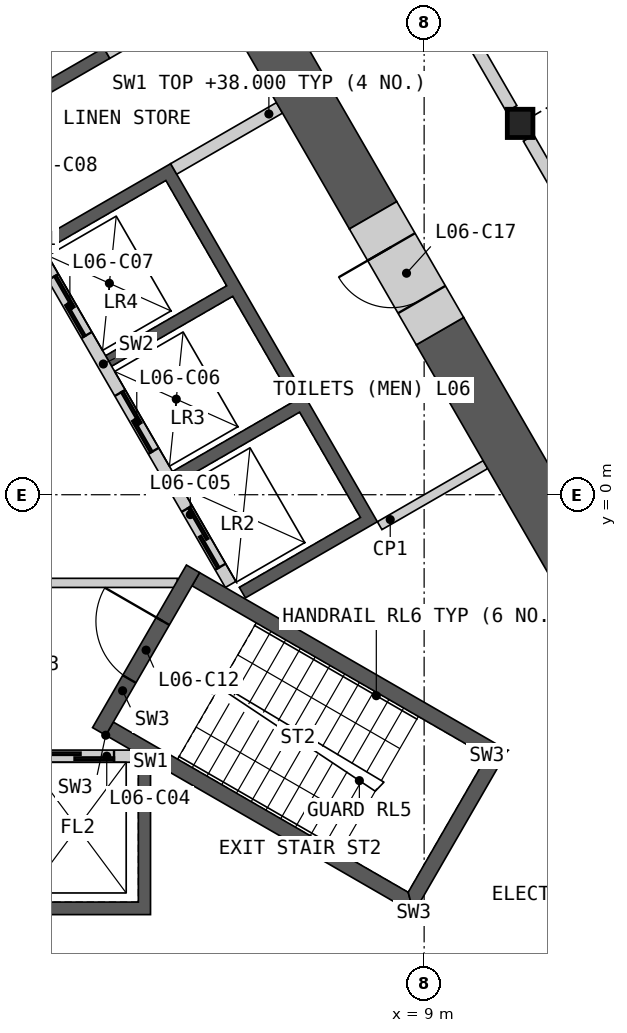
"""IFC4 building model, lengths in metres.
Left out: names, types, materials, properties, quantities, classifications, styles, units other than length and angle.
Written with IfcOpenShell. Run it as: python <this file> out.ifc"""

import sys

from ifc_helpers import new_model, si_unit, direction, frame, frame_2d, origin, origin_2d, place, context, subcontext, project, spatial, polyline, rectangle, i_section, outline, extrude, element, fill, save


model = new_model("IFC4")
c1 = context("Model", 3, precision=1e-05, world=origin(), true_north=direction((0.0, 1.0)))
c2 = subcontext(c1, "Body", "Model", "MODEL_VIEW")
j1 = project(units=[si_unit("LENGTHUNIT", "METRE"), si_unit("PLANEANGLEUNIT", "RADIAN")], contexts=[c1])
p1 = place(None, origin())
s1 = spatial("IfcSite", under=j1, at=p1, CompositionType="ELEMENT")
p2 = place(p1, origin())
s2 = spatial("IfcBuilding", under=s1, at=p2, CompositionType="ELEMENT")
p3 = place(p2, frame((0.0, 0.0, 34.2)))
s3 = spatial("IfcBuildingStorey", under=s2, at=p3, CompositionType="ELEMENT", Elevation=34.2)
p4 = place(p3, frame((10.578, 6.107, 0.0), z_axis=(0.0, 0.0, 1.0), x_axis=(1.0, 0.0, 0.0)))
e1 = element("IfcColumn", 1, at=p4, inside=s3, PredefinedType="COLUMN", context=c2, shape_type="SweptSolid", body=[
    extrude(i_section(OverallWidth=0.421, OverallDepth=0.465, WebThickness=0.045, FlangeThickness=0.072, at=origin_2d()), origin(), (0.0, 0.0, 1.0), 4.2),
])
p5 = place(p3, origin())
e2 = element("IfcWall", 2, at=p5, inside=s3, PredefinedType="SHEAR", context=c2, shape_type="SweptSolid", body=[
    extrude(outline(polyline([(4.5, -4.4), (4.5, -6.906), (-4.5, -6.906), (-4.5, -4.4), (-4.3, -4.4), (-4.3, -6.7), (-2.3, -6.7), (-2.3, -4.4), (-2.1, -4.4), (-2.1, -6.7), (-0.1, -6.7), (-0.1, -4.4), (0.1, -4.4), (0.1, -6.7), (2.1, -6.7), (2.1, -4.4), (2.3, -4.4), (2.3, -6.7), (4.3, -6.7), (4.3, -4.4), (4.5, -4.4)])), origin(), (0.0, 0.0, 1.0), 3.8),
])
p6 = place(p3, frame((-4.187, -4.3, 0.0), z_axis=(0.0, 0.0, 1.0), x_axis=(1.0, 0.0, 0.0)))
e3 = element("IfcWall", 3, at=p6, inside=s3, PredefinedType="SOLIDWALL", context=c2, shape_type="SweptSolid", body=[
    extrude(rectangle(XDim=8.373, YDim=0.2, at=frame_2d((4.187, 0.0))), origin(), (0.0, 0.0, 1.0), 3.8),
])
p7 = place(p6, frame((0.287, 0.0, 0.0)))
e4 = element("IfcOpeningElement", 4, at=p7, cuts=e3, PredefinedType="OPENING", context=c2, shape_type="SweptSolid", body=[
    extrude(rectangle(XDim=1.2, YDim=2.1, at=frame_2d((0.6, 1.05))), frame((0.0, 0.11, 0.0), z_axis=(0.0, -1.0, 0.0), x_axis=(1.0, 0.0, 0.0)), (0.0, 0.0, 1.0), 0.22),
])
p8 = place(p6, frame((2.387, 0.0, 0.0)))
e5 = element("IfcOpeningElement", 5, at=p8, cuts=e3, PredefinedType="OPENING", context=c2, shape_type="SweptSolid", body=[
    extrude(rectangle(XDim=1.4, YDim=2.1, at=frame_2d((0.7, 1.05))), frame((0.0, 0.11, 0.0), z_axis=(0.0, -1.0, 0.0), x_axis=(1.0, 0.0, 0.0)), (0.0, 0.0, 1.0), 0.22),
])
p9 = place(p6, frame((4.737, 0.0, 0.0)))
e6 = element("IfcOpeningElement", 6, at=p9, cuts=e3, PredefinedType="OPENING", context=c2, shape_type="SweptSolid", body=[
    extrude(rectangle(XDim=1.1, YDim=2.1, at=frame_2d((0.55, 1.05))), frame((0.0, 0.11, 0.0), z_axis=(0.0, -1.0, 0.0), x_axis=(1.0, 0.0, 0.0)), (0.0, 0.0, 1.0), 0.22),
])
p10 = place(p6, frame((6.887, 0.0, 0.0)))
e7 = element("IfcOpeningElement", 7, at=p10, cuts=e3, PredefinedType="OPENING", context=c2, shape_type="SweptSolid", body=[
    extrude(rectangle(XDim=1.2, YDim=2.1, at=frame_2d((0.6, 1.05))), frame((0.0, 0.11, 0.0), z_axis=(0.0, -1.0, 0.0), x_axis=(1.0, 0.0, 0.0)), (0.0, 0.0, 1.0), 0.22),
])
p11 = place(p3, origin())
e8 = element("IfcWall", 8, at=p11, inside=s3, PredefinedType="SHEAR", context=c2, shape_type="SweptSolid", body=[
    extrude(outline(polyline([(1.561, 6.097), (3.731, 7.35), (3.831, 7.177), (1.66, 5.924), (1.561, 6.097)])), origin(), (0.0, 0.0, 1.0), 3.8),
])
p12 = place(p3, origin())
e9 = element("IfcWall", 9, at=p12, inside=s3, PredefinedType="SHEAR", context=c2, shape_type="SweptSolid", body=[
    extrude(outline(polyline([(2.66, 4.192), (4.831, 5.445), (8.231, -0.444), (6.061, -1.697), (5.96, -1.524), (7.952, -0.374), (6.952, 1.358), (4.96, 0.208), (4.861, 0.381), (6.852, 1.531), (5.852, 3.263), (3.861, 2.113), (3.76, 2.287), (5.752, 3.437), (4.752, 5.169), (2.76, 4.019), (2.66, 4.192)])), origin(), (0.0, 0.0, 1.0), 3.8),
])
p13 = place(p3, frame((5.817, -1.476, 0.0), z_axis=(0.0, 0.0, 1.0), x_axis=(-0.500002616675, 0.866023893041, 0.0)))
e10 = element("IfcWall", 10, at=p13, inside=s3, PredefinedType="SOLIDWALL", context=c2, shape_type="SweptSolid", body=[
    extrude(rectangle(XDim=8.373, YDim=0.2, at=frame_2d((4.187, 0.0))), origin(), (0.0, 0.0, 1.0), 3.8),
])
p14 = place(p13, frame((0.337, 0.0, 0.0)))
e11 = element("IfcOpeningElement", 11, at=p14, cuts=e10, PredefinedType="OPENING", context=c2, shape_type="SweptSolid", body=[
    extrude(rectangle(XDim=1.1, YDim=2.1, at=frame_2d((0.55, 1.05))), frame((0.0, 0.11, 0.0), z_axis=(0.0, -1.0, 0.0), x_axis=(1.0, 0.0, 0.0)), (0.0, 0.0, 1.0), 0.22),
])
p15 = place(p13, frame((2.537, 0.0, 0.0)))
e12 = element("IfcOpeningElement", 12, at=p15, cuts=e10, PredefinedType="OPENING", context=c2, shape_type="SweptSolid", body=[
    extrude(rectangle(XDim=1.1, YDim=2.1, at=frame_2d((0.55, 1.05))), frame((0.0, 0.11, 0.0), z_axis=(0.0, -1.0, 0.0), x_axis=(1.0, 0.0, 0.0)), (0.0, 0.0, 1.0), 0.22),
])
p16 = place(p13, frame((4.737, 0.0, 0.0)))
e13 = element("IfcOpeningElement", 13, at=p16, cuts=e10, PredefinedType="OPENING", context=c2, shape_type="SweptSolid", body=[
    extrude(rectangle(XDim=1.1, YDim=2.1, at=frame_2d((0.55, 1.05))), frame((0.0, 0.11, 0.0), z_axis=(0.0, -1.0, 0.0), x_axis=(1.0, 0.0, 0.0)), (0.0, 0.0, 1.0), 0.22),
])
p17 = place(p13, frame((7.037, 0.0, 0.0)))
e14 = element("IfcOpeningElement", 14, at=p17, cuts=e10, PredefinedType="OPENING", context=c2, shape_type="SweptSolid", body=[
    extrude(rectangle(XDim=0.9, YDim=2.1, at=frame_2d((0.45, 1.05))), frame((0.0, 0.11, 0.0), z_axis=(0.0, -1.0, 0.0), x_axis=(1.0, 0.0, 0.0)), (0.0, 0.0, 1.0), 0.22),
])
p18 = place(p3, frame((4.881, 5.358, 0.0), z_axis=(0.0, 0.0, 1.0), x_axis=(0.866035824272, 0.499981950752, 0.0)))
e15 = element("IfcWall", 15, at=p18, inside=s3, PredefinedType="SHEAR", context=c2, shape_type="SweptSolid", body=[
    extrude(rectangle(XDim=2.009, YDim=0.2, at=frame_2d((1.004, 0.0))), origin(), (0.0, 0.0, 1.0), 3.8),
])
p19 = place(p3, frame((3.781, 7.263, 0.0), z_axis=(0.0, 0.0, 1.0), x_axis=(0.865983199114, 0.50007309351, 0.0)))
e16 = element("IfcWall", 16, at=p19, inside=s3, PredefinedType="SHEAR", context=c2, shape_type="SweptSolid", body=[
    extrude(rectangle(XDim=2.009, YDim=0.2, at=frame_2d((1.004, 0.0))), origin(), (0.0, 0.0, 1.0), 3.8),
])
p20 = place(p3, frame((-4.941, -1.45, 0.0), z_axis=(0.0, 0.0, 1.0), x_axis=(1.0, 0.0, 0.0)))
e17 = element("IfcWall", 17, at=p20, inside=s3, PredefinedType="PARTITIONING", context=c2, shape_type="SweptSolid", body=[
    extrude(rectangle(XDim=9.882, YDim=0.15, at=frame_2d((4.941, 0.0))), origin(), (0.0, 0.0, 1.0), 3.8),
])
p21 = place(p20, frame((4.391, 0.0, 0.0)))
e18 = element("IfcOpeningElement", 18, at=p21, cuts=e17, PredefinedType="OPENING", context=c2, shape_type="SweptSolid", body=[
    extrude(rectangle(XDim=1.1, YDim=2.1, at=frame_2d((0.55, 1.05))), frame((0.0, 0.085, 0.0), z_axis=(0.0, -1.0, 0.0), x_axis=(1.0, 0.0, 0.0)), (0.0, 0.0, 1.0), 0.17),
])
p22 = place(p3, origin())
e19 = element("IfcWall", 19, at=p22, inside=s3, PredefinedType="SHEAR", context=c2, shape_type="SweptSolid", body=[
    extrude(outline(polyline([(3.763, -3.956), (8.83, -6.881), (8.738, -6.539), (3.888, -3.739), (3.763, -3.956)])), origin(), (0.0, 0.0, 1.0), 3.8),
])
p23 = place(p3, origin())
e20 = element("IfcWall", 20, at=p23, inside=s3, PredefinedType="SHEAR", context=c2, shape_type="SweptSolid", body=[
    extrude(outline(polyline([(8.83, -6.881), (10.374, -4.206), (10.032, -4.298), (8.738, -6.539), (8.83, -6.881)])), origin(), (0.0, 0.0, 1.0), 3.8),
])
p24 = place(p3, origin())
e21 = element("IfcWall", 21, at=p24, inside=s3, PredefinedType="SHEAR", context=c2, shape_type="SweptSolid", body=[
    extrude(outline(polyline([(10.032, -4.298), (10.374, -4.206), (5.307, -1.281), (5.182, -1.498), (10.032, -4.298)])), origin(), (0.0, 0.0, 1.0), 3.8),
])
p25 = place(p3, frame((3.655, -3.893, 0.0), z_axis=(0.0, 0.0, 1.0), x_axis=(0.499982516597, 0.866035497597, 0.0)))
e22 = element("IfcWall", 22, at=p25, inside=s3, PredefinedType="SHEAR", context=c2, shape_type="SweptSolid", body=[
    extrude(rectangle(XDim=3.088, YDim=0.25, at=frame_2d((1.544, 0.0))), origin(), (0.0, 0.0, 1.0), 3.8),
])
p26 = place(p25, frame((0.994, 0.0, 0.0)))
e23 = element("IfcOpeningElement", 23, at=p26, cuts=e22, PredefinedType="OPENING", context=c2, shape_type="SweptSolid", body=[
    extrude(rectangle(XDim=1.1, YDim=2.1, at=frame_2d((0.55, 1.05))), frame((0.0, 0.135, 0.0), z_axis=(0.0, -1.0, 0.0), x_axis=(1.0, 0.0, 0.0)), (0.0, 0.0, 1.0), 0.27),
])
p27 = place(p3, frame((8.268, -0.509, 0.0), z_axis=(0.0, 0.0, 1.0), x_axis=(0.866035824272, 0.499981950752, 0.0)))
e24 = element("IfcWall", 24, at=p27, inside=s3, PredefinedType="PARTITIONING", context=c2, shape_type="SweptSolid", body=[
    extrude(rectangle(XDim=2.009, YDim=0.15, at=frame_2d((1.004, 0.0))), origin(), (0.0, 0.0, 1.0), 3.8),
])
p28 = place(p3, frame((15.831, -8.69, 0.0), z_axis=(0.0, 0.0, 1.0), x_axis=(-0.499997452939, 0.866026874326, 0.0)))
e25 = element("IfcWall", 25, at=p28, inside=s3, PredefinedType="SHEAR", context=c2, shape_type="SweptSolid", body=[
    extrude(rectangle(XDim=13.141, YDim=0.9, at=frame_2d((6.571, 0.0))), origin(), (0.0, 0.0, 1.0), 3.8),
])
p29 = place(p3, frame((8.16, 4.596, 0.0), z_axis=(0.0, 0.0, 1.0), x_axis=(-0.500012259336, 0.866018325738, 0.0)))
e26 = element("IfcWall", 26, at=p29, inside=s3, PredefinedType="SHEAR", context=c2, shape_type="SweptSolid", body=[
    extrude(rectangle(XDim=7.389, YDim=0.9, at=frame_2d((3.695, 0.0))), origin(), (0.0, 0.0, 1.0), 3.8),
])
p30 = place(p3, frame((9.26, 2.691, 0.0), z_axis=(0.0, 0.0, 1.0), x_axis=(-0.499946605688, 0.86605622881, 0.0)))
e27 = element("IfcWall", 27, at=p30, inside=s3, PredefinedType="SHEAR", context=c2, shape_type="SweptSolid", body=[
    extrude(rectangle(XDim=2.2, YDim=0.9, at=frame_2d((1.1, 0.0))), origin(), (0.0, 0.0, 1.0), 3.8),
])
p31 = place(p30, frame((0.6, 0.0, 0.0)))
e28 = element("IfcOpeningElement", 28, at=p31, cuts=e27, PredefinedType="OPENING", context=c2, shape_type="SweptSolid", body=[
    extrude(rectangle(XDim=1.0, YDim=2.1, at=frame_2d((0.5, 1.05))), frame((0.0, 0.46, 0.0), z_axis=(0.0, -1.0, 0.0), x_axis=(1.0, 0.0, 0.0)), (0.0, 0.0, 1.0), 0.92),
])
p32 = place(p3, frame((5.429, 15.026, 0.0), z_axis=(0.0, 0.0, 1.0), x_axis=(0.50001002959, -0.86601961312, 0.0)))
e29 = element("IfcWall", 29, at=p32, inside=s3, PredefinedType="PARTITIONING", context=c2, shape_type="SweptSolid", body=[
    extrude(rectangle(XDim=10.019, YDim=0.2, at=frame_2d((5.009, 0.0))), origin(), (0.0, 0.0, 1.0), 3.8),
])
p33 = place(p32, frame((7.266, 0.0, 0.0)))
e30 = element("IfcOpeningElement", 30, at=p33, cuts=e29, PredefinedType="OPENING", context=c2, shape_type="SweptSolid", body=[
    extrude(rectangle(XDim=1.0, YDim=2.1, at=frame_2d((0.5, 1.05))), frame((0.0, 0.11, 0.0), z_axis=(0.0, -1.0, 0.0), x_axis=(1.0, 0.0, 0.0)), (0.0, 0.0, 1.0), 0.22),
])
p34 = place(p32, frame((2.254, 0.0, 0.0)))
e31 = element("IfcOpeningElement", 31, at=p34, cuts=e29, PredefinedType="OPENING", context=c2, shape_type="SweptSolid", body=[
    extrude(rectangle(XDim=1.0, YDim=2.1, at=frame_2d((0.5, 1.05))), frame((0.0, 0.11, 0.0), z_axis=(0.0, -1.0, 0.0), x_axis=(1.0, 0.0, 0.0)), (0.0, 0.0, 1.0), 0.22),
])
p35 = place(p3, frame((10.719, 5.865, 0.0), z_axis=(0.0, 0.0, 1.0), x_axis=(0.49999175339, -0.866030164915, 0.0)))
e32 = element("IfcWall", 32, at=p35, inside=s3, PredefinedType="PARTITIONING", context=c2, shape_type="SweptSolid", body=[
    extrude(rectangle(XDim=10.019, YDim=0.2, at=frame_2d((5.009, 0.0))), origin(), (0.0, 0.0, 1.0), 3.8),
])
p36 = place(p35, frame((6.764, 0.0, 0.0)))
e33 = element("IfcOpeningElement", 33, at=p36, cuts=e32, PredefinedType="OPENING", context=c2, shape_type="SweptSolid", body=[
    extrude(rectangle(XDim=1.0, YDim=2.1, at=frame_2d((0.5, 1.05))), frame((0.0, 0.11, 0.0), z_axis=(0.0, -1.0, 0.0), x_axis=(1.0, 0.0, 0.0)), (0.0, 0.0, 1.0), 0.22),
])
p37 = place(p10, origin())
e34 = element("IfcDoor", 34, at=p37, inside=s3, OperationType="SLIDING_TO_LEFT", PredefinedType="DOOR", context=c2, shape_type="SweptSolid", body=[
    extrude(rectangle(XDim=1.2, YDim=2.1, at=frame_2d((0.6, 1.05))), frame((0.0, 0.025, 0.0), z_axis=(0.0, -1.0, 0.0), x_axis=(1.0, 0.0, 0.0)), (0.0, 0.0, 1.0), 0.05),
])
fill(e7, e34)
p38 = place(p14, origin())
e35 = element("IfcDoor", 35, at=p38, inside=s3, OperationType="SLIDING_TO_LEFT", PredefinedType="DOOR", context=c2, shape_type="SweptSolid", body=[
    extrude(rectangle(XDim=1.1, YDim=2.1, at=frame_2d((0.55, 1.05))), frame((0.0, 0.025, 0.0), z_axis=(0.0, -1.0, 0.0), x_axis=(1.0, 0.0, 0.0)), (0.0, 0.0, 1.0), 0.05),
])
fill(e11, e35)
p39 = place(p15, origin())
e36 = element("IfcDoor", 36, at=p39, inside=s3, OperationType="SLIDING_TO_LEFT", PredefinedType="DOOR", context=c2, shape_type="SweptSolid", body=[
    extrude(rectangle(XDim=1.1, YDim=2.1, at=frame_2d((0.55, 1.05))), frame((0.0, 0.025, 0.0), z_axis=(0.0, -1.0, 0.0), x_axis=(1.0, 0.0, 0.0)), (0.0, 0.0, 1.0), 0.05),
])
fill(e12, e36)
p40 = place(p16, origin())
e37 = element("IfcDoor", 37, at=p40, inside=s3, OperationType="SLIDING_TO_LEFT", PredefinedType="DOOR", context=c2, shape_type="SweptSolid", body=[
    extrude(rectangle(XDim=1.1, YDim=2.1, at=frame_2d((0.55, 1.05))), frame((0.0, 0.025, 0.0), z_axis=(0.0, -1.0, 0.0), x_axis=(1.0, 0.0, 0.0)), (0.0, 0.0, 1.0), 0.05),
])
fill(e13, e37)
p41 = place(p26, origin())
e38 = element("IfcDoor", 38, at=p41, inside=s3, OperationType="SINGLE_SWING_RIGHT", PredefinedType="DOOR", context=c2, shape_type="SweptSolid", body=[
    extrude(rectangle(XDim=1.1, YDim=2.1, at=frame_2d((0.55, 1.05))), frame((0.0, 0.025, 0.0), z_axis=(0.0, -1.0, 0.0), x_axis=(1.0, 0.0, 0.0)), (0.0, 0.0, 1.0), 0.05),
])
fill(e23, e38)
p42 = place(p31, origin())
e39 = element("IfcDoor", 39, at=p42, inside=s3, OperationType="SINGLE_SWING_RIGHT", PredefinedType="DOOR", context=c2, shape_type="SweptSolid", body=[
    extrude(rectangle(XDim=1.0, YDim=2.1, at=frame_2d((0.5, 1.05))), frame((0.0, 0.205, 0.0), z_axis=(0.0, -1.0, 0.0), x_axis=(1.0, 0.0, 0.0)), (0.0, 0.0, 1.0), 0.05),
])
fill(e28, e39)
save(model, sys.argv[1])
